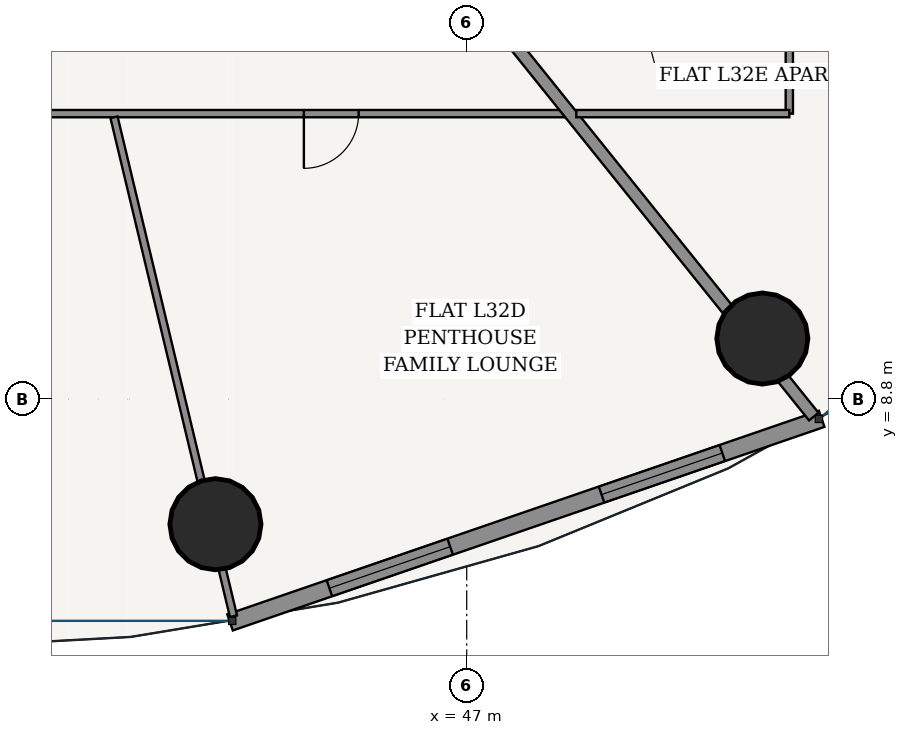
"""IFC4 building model, lengths in metres.
Left out: names, types, materials, properties, quantities, classifications, styles, units other than length and angle.
Written with IfcOpenShell. Run it as: python <this file> out.ifc"""

import sys

from ifc_helpers import new_model, si_unit, direction, frame, frame_2d, origin, origin_2d, place, context, subcontext, project, spatial, rectangle, hollow_circle, extrude, source, transform, mapped, element, fill, save


model = new_model("IFC4")
c1 = context("Model", 3, precision=1e-05, world=origin(), true_north=direction((-0.2419218956, 0.970295726276)))
c2 = subcontext(c1, "Body", "Model", "MODEL_VIEW")
j1 = project(units=[si_unit("LENGTHUNIT", "METRE"), si_unit("PLANEANGLEUNIT", "RADIAN")], contexts=[c1])
p1 = place(None, origin())
s1 = spatial("IfcSite", under=j1, at=p1, CompositionType="ELEMENT")
p2 = place(p1, origin())
s2 = spatial("IfcBuilding", under=s1, at=p2, CompositionType="ELEMENT")
p3 = place(p2, frame((0.0, 0.0, 123.0)))
s3 = spatial("IfcBuildingStorey", under=s2, at=p3, CompositionType="ELEMENT", Elevation=123.0)
for number, where, z_axis, x_axis in (
    (1, (42.867, 6.743, 0.0), (0.0, 0.0, 1.0), (1.0, 0.0, 0.0)),
    (2, (51.862, 9.796, 0.0), (0.0, 0.0, 1.0), (1.0, 0.0, 0.0)),
):
    element("IfcColumn", number, at=place(p3, frame(where, z_axis=z_axis, x_axis=x_axis)), inside=s3, PredefinedType="COLUMN", context=c2, shape_type="SweptSolid", body=[
        extrude(hollow_circle(Radius=0.75, WallThickness=0.045, at=origin_2d()), origin(), (0.0, 0.0, 1.0), 3.6),
    ])
p4 = place(p3, frame((43.108, 5.128, 0.0), z_axis=(0.0, 0.0, 1.0), x_axis=(0.945590132341, 0.325360264351, 0.0)))
e3 = element("IfcWall", 3, at=p4, inside=s3, PredefinedType="SOLIDWALL", context=c2, shape_type="SweptSolid", body=[
    extrude(rectangle(XDim=10.289, YDim=0.28, at=frame_2d((5.145, 0.0))), origin(), (0.0, 0.0, 1.0), 3.325),
])
p5 = place(p4, frame((1.728, 0.0, 0.85)))
e4 = element("IfcOpeningElement", 4, at=p5, cuts=e3, PredefinedType="OPENING", context=c2, shape_type="SweptSolid", body=[
    extrude(rectangle(XDim=2.1, YDim=1.95, at=frame_2d((1.05, 0.975))), frame((0.0, 0.15, 0.0), z_axis=(0.0, -1.0, 0.0), x_axis=(1.0, 0.0, 0.0)), (0.0, 0.0, 1.0), 0.3),
])
p6 = place(p4, frame((6.461, 0.0, 0.85)))
e5 = element("IfcOpeningElement", 5, at=p6, cuts=e3, PredefinedType="OPENING", context=c2, shape_type="SweptSolid", body=[
    extrude(rectangle(XDim=2.1, YDim=1.95, at=frame_2d((1.05, 0.975))), frame((0.0, 0.15, 0.0), z_axis=(0.0, -1.0, 0.0), x_axis=(1.0, 0.0, 0.0)), (0.0, 0.0, 1.0), 0.3),
])
p7 = place(p3, frame((48.598, 13.495, 0.0), z_axis=(0.0, 0.0, 1.0), x_axis=(-1.0, 0.0, 0.0)))
e6 = element("IfcWall", 6, at=p7, inside=s3, PredefinedType="PARTITIONING", context=c2, shape_type="SweptSolid", body=[
    extrude(rectangle(XDim=24.903, YDim=0.12, at=frame_2d((12.452, 0.0))), origin(), (0.0, 0.0, 1.0), 2.767),
])
p8 = place(p7, frame((17.72, 0.0, 0.0)))
e7 = element("IfcOpeningElement", 7, at=p8, cuts=e6, PredefinedType="OPENING", context=c2, shape_type="SweptSolid", body=[
    extrude(rectangle(XDim=0.9, YDim=2.15, at=frame_2d((0.45, 1.075))), frame((0.0, 0.07, 0.0), z_axis=(0.0, -1.0, 0.0), x_axis=(1.0, 0.0, 0.0)), (0.0, 0.0, 1.0), 0.14),
])
p9 = place(p7, frame((11.637, 0.0, 0.0)))
e8 = element("IfcOpeningElement", 8, at=p9, cuts=e6, PredefinedType="OPENING", context=c2, shape_type="SweptSolid", body=[
    extrude(rectangle(XDim=0.9, YDim=2.15, at=frame_2d((0.45, 1.075))), frame((0.0, 0.07, 0.0), z_axis=(0.0, -1.0, 0.0), x_axis=(1.0, 0.0, 0.0)), (0.0, 0.0, 1.0), 0.14),
])
p10 = place(p7, frame((3.376, 0.0, 0.0)))
e9 = element("IfcOpeningElement", 9, at=p10, cuts=e6, PredefinedType="OPENING", context=c2, shape_type="SweptSolid", body=[
    extrude(rectangle(XDim=0.9, YDim=2.15, at=frame_2d((0.45, 1.075))), frame((0.0, 0.07, 0.0), z_axis=(0.0, -1.0, 0.0), x_axis=(1.0, 0.0, 0.0)), (0.0, 0.0, 1.0), 0.14),
])
p11 = place(p3, frame((41.2, 13.435, 0.0), z_axis=(0.0, 0.0, 1.0), x_axis=(0.232814779051, -0.972521094196, 0.0)))
e10 = element("IfcWall", 10, at=p11, inside=s3, PredefinedType="PARTITIONING", context=c2, shape_type="SweptSolid", body=[
    extrude(rectangle(XDim=8.438, YDim=0.12, at=frame_2d((4.219, 0.0))), origin(), (0.0, 0.0, 1.0), 2.767),
])
p12 = place(p3, frame((46.352, 16.415, 0.0), z_axis=(0.0, 0.0, 1.0), x_axis=(0.626701127389, -0.779259710834, 0.0)))
e11 = element("IfcWall", 11, at=p12, inside=s3, PredefinedType="PARTITIONING", context=c2, shape_type="SweptSolid", body=[
    extrude(rectangle(XDim=10.141, YDim=0.2, at=frame_2d((5.071, 0.0))), origin(), (0.0, 0.0, 1.0), 2.767),
])
p13 = place(p3, frame((52.305, 29.062, 0.0), z_axis=(0.0, 0.0, 1.0), x_axis=(0.0, -1.0, 0.0)))
e12 = element("IfcWall", 12, at=p13, inside=s3, PredefinedType="PARTITIONING", context=c2, shape_type="SweptSolid", body=[
    extrude(rectangle(XDim=15.567, YDim=0.12, at=frame_2d((7.783, 0.0))), origin(), (0.0, 0.0, 1.0), 2.767),
])
p14 = place(p13, frame((12.535, 0.0, 0.0)))
e13 = element("IfcOpeningElement", 13, at=p14, cuts=e12, PredefinedType="OPENING", context=c2, shape_type="SweptSolid", body=[
    extrude(rectangle(XDim=0.9, YDim=2.15, at=frame_2d((0.45, 1.075))), frame((0.0, 0.07, 0.0), z_axis=(0.0, -1.0, 0.0), x_axis=(1.0, 0.0, 0.0)), (0.0, 0.0, 1.0), 0.14),
])
p15 = place(p13, frame((2.582, 0.0, 0.0)))
e14 = element("IfcOpeningElement", 14, at=p15, cuts=e12, PredefinedType="OPENING", context=c2, shape_type="SweptSolid", body=[
    extrude(rectangle(XDim=0.9, YDim=2.15, at=frame_2d((0.45, 1.075))), frame((0.0, 0.07, 0.0), z_axis=(0.0, -1.0, 0.0), x_axis=(1.0, 0.0, 0.0)), (0.0, 0.0, 1.0), 0.14),
])
p16 = place(p3, frame((52.305, 13.495, 0.0), z_axis=(0.0, 0.0, 1.0), x_axis=(-1.0, 0.0, 0.0)))
e15 = element("IfcWall", 15, at=p16, inside=s3, PredefinedType="PARTITIONING", context=c2, shape_type="SweptSolid", body=[
    extrude(rectangle(XDim=3.503, YDim=0.12, at=frame_2d((1.751, 0.0))), origin(), (0.0, 0.0, 1.0), 2.767),
])
m1 = source(origin(), c2, "Body", "SweptSolid", [
    extrude(rectangle(XDim=2.1, YDim=1.95, at=frame_2d((1.05, 0.975))), frame((0.0, 0.03, 0.0), z_axis=(0.0, -1.0, 0.0), x_axis=(1.0, 0.0, 0.0)), (0.0, 0.0, 1.0), 0.06),
])
p17 = place(p5, origin())
e16 = element("IfcWindow", 16, at=p17, inside=s3, PartitioningType="SINGLE_PANEL", PredefinedType="WINDOW", context=c2, shape_type="MappedRepresentation", body=[
    mapped(m1, transform((0.0, 0.0, 0.0), scale=1.0)),
])
fill(e4, e16)
p18 = place(p6, origin())
e17 = element("IfcWindow", 17, at=p18, inside=s3, PartitioningType="SINGLE_PANEL", PredefinedType="WINDOW", context=c2, shape_type="MappedRepresentation", body=[
    mapped(m1, transform((0.0, 0.0, 0.0), scale=1.0)),
])
fill(e5, e17)
m2 = source(origin(), c2, "Body", "SweptSolid", [
    extrude(rectangle(XDim=0.9, YDim=2.15, at=frame_2d((0.45, 1.075))), frame((0.0, 0.025, 0.0), z_axis=(0.0, -1.0, 0.0), x_axis=(1.0, 0.0, 0.0)), (0.0, 0.0, 1.0), 0.05),
])
p19 = place(p10, origin())
e18 = element("IfcDoor", 18, at=p19, inside=s3, OperationType="SINGLE_SWING_RIGHT", PredefinedType="DOOR", context=c2, shape_type="MappedRepresentation", body=[
    mapped(m2, transform((0.0, 0.0, 0.0), scale=1.0)),
])
fill(e9, e18)
save(model, sys.argv[1])
